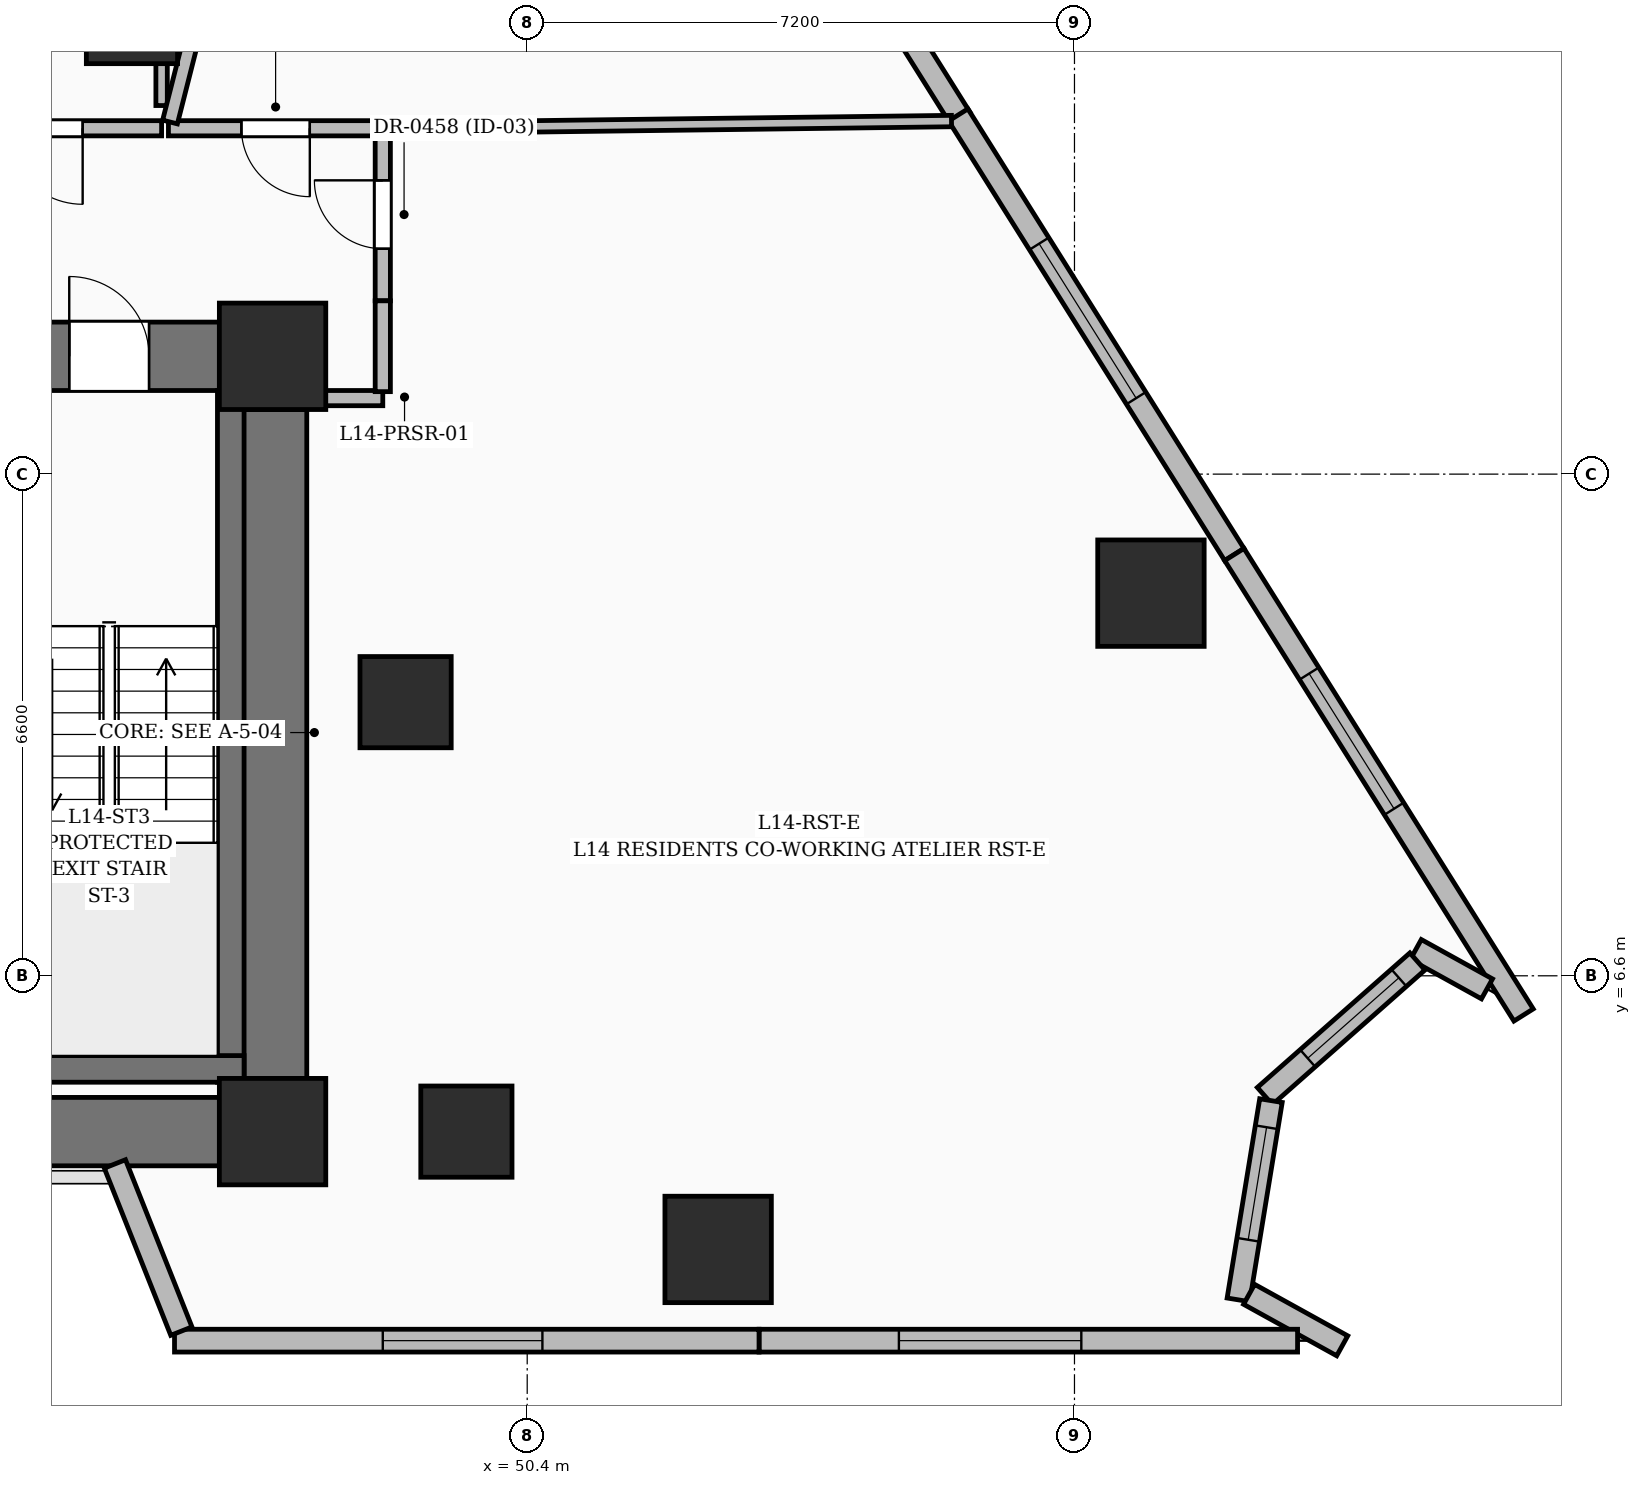
"""IFC4 building model, lengths in metres.
Left out: names, types, materials, properties, quantities, classifications, styles, units other than length and angle.
Written with IfcOpenShell. Run it as: python <this file> out.ifc"""

import sys

from ifc_helpers import new_model, si_unit, direction, frame, frame_2d, origin, origin_2d, place, context, subcontext, project, spatial, rectangle, extrude, element, fill, save


model = new_model("IFC4")
c1 = context("Model", 3, precision=1e-05, world=origin(), true_north=direction((0.0, 1.0)))
c2 = subcontext(c1, "Body", "Model", "MODEL_VIEW")
j1 = project(units=[si_unit("LENGTHUNIT", "METRE"), si_unit("PLANEANGLEUNIT", "RADIAN")], contexts=[c1])
p1 = place(None, origin())
s1 = spatial("IfcSite", under=j1, at=p1, CompositionType="ELEMENT")
p2 = place(p1, origin())
s2 = spatial("IfcBuilding", under=s1, at=p2, CompositionType="ELEMENT")
p3 = place(p2, frame((0.0, 0.0, 60.6)))
s3 = spatial("IfcBuildingStorey", under=s2, at=p3, CompositionType="ELEMENT", Elevation=60.6)
for number, where, z_axis, x_axis in (
    (1, (47.05, 4.55, 0.0), (0.0, 0.0, 1.0), (1.0, 0.0, 0.0)),
    (2, (47.05, 14.75, 0.0), (0.0, 0.0, 1.0), (1.0, 0.0, 0.0)),
):
    element("IfcColumn", number, at=place(p3, frame(where, z_axis=z_axis, x_axis=x_axis)), inside=s3, PredefinedType="COLUMN", context=c2, shape_type="SweptSolid", body=[
        extrude(rectangle(XDim=1.4, YDim=1.4, at=origin_2d()), origin(), (0.0, 0.0, 1.0), 3.6),
    ])
for number, where, z_axis, x_axis in (
    (3, (49.6, 4.55, 0.0), (0.0, 0.0, 1.0), (1.0, 0.0, 0.0)),
    (4, (48.8, 10.2, 0.0), (0.0, 0.0, 1.0), (1.0, 0.0, 0.0)),
    (5, (45.2, 19.2, 0.0), (0.0, 0.0, 1.0), (1.0, 0.0, 0.0)),
):
    element("IfcColumn", number, at=place(p3, frame(where, z_axis=z_axis, x_axis=x_axis)), inside=s3, PredefinedType="COLUMN", context=c2, shape_type="SweptSolid", body=[
        extrude(rectangle(XDim=1.2, YDim=1.2, at=origin_2d()), origin(), (0.0, 0.0, 1.0), 3.6),
    ])
p4 = place(p3, frame((35.85, 4.55, 0.0), z_axis=(0.0, 0.0, 1.0), x_axis=(1.0, 0.0, 0.0)))
e6 = element("IfcWall", 6, at=p4, inside=s3, PredefinedType="SHEAR", context=c2, shape_type="SweptSolid", body=[
    extrude(rectangle(XDim=10.5, YDim=0.9, at=frame_2d((5.25, 0.0))), origin(), (0.0, 0.0, 1.0), 3.6),
])
p5 = place(p3, frame((35.85, 14.75, 0.0), z_axis=(0.0, 0.0, 1.0), x_axis=(1.0, 0.0, 0.0)))
e7 = element("IfcWall", 7, at=p5, inside=s3, PredefinedType="SHEAR", context=c2, shape_type="SweptSolid", body=[
    extrude(rectangle(XDim=10.5, YDim=0.9, at=frame_2d((5.25, 0.0))), origin(), (0.0, 0.0, 1.0), 3.6),
])
p6 = place(p5, frame((0.925, 0.0, 0.0)))
e8 = element("IfcOpeningElement", 8, at=p6, cuts=e7, PredefinedType="OPENING", context=c2, shape_type="SweptSolid", body=[
    extrude(rectangle(XDim=1.05, YDim=2.15, at=frame_2d((0.525, 1.075))), frame((0.0, 0.46, 0.0), z_axis=(0.0, -1.0, 0.0), x_axis=(1.0, 0.0, 0.0)), (0.0, 0.0, 1.0), 0.92),
])
p7 = place(p5, frame((8.525, 0.0, 0.0)))
e9 = element("IfcOpeningElement", 9, at=p7, cuts=e7, PredefinedType="OPENING", context=c2, shape_type="SweptSolid", body=[
    extrude(rectangle(XDim=1.05, YDim=2.15, at=frame_2d((0.525, 1.075))), frame((0.0, 0.46, 0.0), z_axis=(0.0, -1.0, 0.0), x_axis=(1.0, 0.0, 0.0)), (0.0, 0.0, 1.0), 0.92),
])
p8 = place(p3, frame((47.05, 5.25, 0.0), z_axis=(0.0, 0.0, 1.0), x_axis=(0.0, 1.0, 0.0)))
e10 = element("IfcWall", 10, at=p8, inside=s3, PredefinedType="SHEAR", context=c2, shape_type="SweptSolid", body=[
    extrude(rectangle(XDim=8.8, YDim=0.9, at=frame_2d((4.4, 0.0))), origin(), (0.0, 0.0, 1.0), 3.6),
])
p9 = place(p3, frame((46.5, 5.2, 0.0), z_axis=(0.0, 0.0, 1.0), x_axis=(0.0, 1.0, 0.0)))
e11 = element("IfcWall", 11, at=p9, inside=s3, PredefinedType="SOLIDWALL", context=c2, shape_type="SweptSolid", body=[
    extrude(rectangle(XDim=9.1, YDim=0.35, at=frame_2d((4.55, 0.0))), origin(), (0.0, 0.0, 1.0), 3.6),
])
p10 = place(p3, frame((43.125, 5.375, 0.0), z_axis=(0.0, 0.0, 1.0), x_axis=(1.0, 0.0, 0.0)))
e12 = element("IfcWall", 12, at=p10, inside=s3, PredefinedType="SOLIDWALL", context=c2, shape_type="SweptSolid", body=[
    extrude(rectangle(XDim=3.55, YDim=0.35, at=frame_2d((1.775, 0.0))), origin(), (0.0, 0.0, 1.0), 3.6),
])
for number, where, z_axis, x_axis in (
    (13, (52.912, 3.0, 0.0), (0.0, 0.0, 1.0), (1.0, 0.0, 0.0)),
    (14, (58.606, 11.634, 0.0), (0.0, 0.0, 1.0), (1.0, 0.0, 0.0)),
):
    element("IfcColumn", number, at=place(p3, frame(where, z_axis=z_axis, x_axis=x_axis)), inside=s3, PredefinedType="COLUMN", context=c2, shape_type="SweptSolid", body=[
        extrude(rectangle(XDim=1.4, YDim=1.4, at=origin_2d()), origin(), (0.0, 0.0, 1.0), 3.6),
    ])
p11 = place(p3, frame((52.093, 24.259, 0.0), z_axis=(0.0, 0.0, 1.0), x_axis=(0.531905989854, -0.846803411635, 0.0)))
e15 = element("IfcWall", 15, at=p11, inside=s3, PredefinedType="SOLIDWALL", context=c2, shape_type="SweptSolid", body=[
    extrude(rectangle(XDim=7.532, YDim=0.3, at=frame_2d((3.766, 0.0))), origin(), (0.0, 0.0, 1.0), 3.35),
])
p12 = place(p11, frame((2.925, 0.0, 0.8)))
e16 = element("IfcOpeningElement", 16, at=p12, cuts=e15, PredefinedType="OPENING", context=c2, shape_type="SweptSolid", body=[
    extrude(rectangle(XDim=1.2, YDim=1.8, at=frame_2d((0.6, 0.9))), frame((0.0, 0.16, 0.0), z_axis=(0.0, -1.0, 0.0), x_axis=(1.0, 0.0, 0.0)), (0.0, 0.0, 1.0), 0.32),
])
p13 = place(p3, frame((56.071, 17.925, 0.0), z_axis=(0.0, 0.0, 1.0), x_axis=(0.531906470689, -0.846803109607, 0.0)))
e17 = element("IfcWall", 17, at=p13, inside=s3, PredefinedType="SOLIDWALL", context=c2, shape_type="SweptSolid", body=[
    extrude(rectangle(XDim=6.829, YDim=0.3, at=frame_2d((3.415, 0.0))), origin(), (0.0, 0.0, 1.0), 3.35),
])
p14 = place(p13, frame((2.0, 0.0, 0.6)))
e18 = element("IfcOpeningElement", 18, at=p14, cuts=e17, PredefinedType="OPENING", context=c2, shape_type="SweptSolid", body=[
    extrude(rectangle(XDim=2.4, YDim=2.1, at=frame_2d((1.2, 1.05))), frame((0.0, 0.16, 0.0), z_axis=(0.0, -1.0, 0.0), x_axis=(1.0, 0.0, 0.0)), (0.0, 0.0, 1.0), 0.32),
])
p15 = place(p3, frame((59.703, 12.143, 0.0), z_axis=(0.0, 0.0, 1.0), x_axis=(0.531917824745, -0.846795977623, 0.0)))
e19 = element("IfcWall", 19, at=p15, inside=s3, PredefinedType="SOLIDWALL", context=c2, shape_type="SweptSolid", body=[
    extrude(rectangle(XDim=7.154, YDim=0.3, at=frame_2d((3.577, 0.0))), origin(), (0.0, 0.0, 1.0), 3.35),
])
p16 = place(p15, frame((1.85, 0.0, 0.55)))
e20 = element("IfcOpeningElement", 20, at=p16, cuts=e19, PredefinedType="OPENING", context=c2, shape_type="SweptSolid", body=[
    extrude(rectangle(XDim=2.1, YDim=2.4, at=frame_2d((1.05, 1.2))), frame((0.0, 0.16, 0.0), z_axis=(0.0, -1.0, 0.0), x_axis=(1.0, 0.0, 0.0)), (0.0, 0.0, 1.0), 0.32),
])
p17 = place(p3, frame((63.027, 6.428, 0.0), z_axis=(0.0, 0.0, 1.0), x_axis=(-0.875134767643, 0.483879260211, 0.0)))
e21 = element("IfcWall", 21, at=p17, inside=s3, PredefinedType="SOLIDWALL", context=c2, shape_type="SweptSolid", body=[
    extrude(rectangle(XDim=1.07, YDim=0.3, at=frame_2d((0.535, 0.0))), origin(), (0.0, 0.0, 1.0), 3.35),
])
p18 = place(p3, frame((62.112, 6.789, 0.0), z_axis=(0.0, 0.0, 1.0), x_axis=(-0.749880449764, -0.661573360303, 0.0)))
e22 = element("IfcWall", 22, at=p18, inside=s3, PredefinedType="SOLIDWALL", context=c2, shape_type="SweptSolid", body=[
    extrude(rectangle(XDim=2.676, YDim=0.3, at=frame_2d((1.338, 0.0))), origin(), (0.0, 0.0, 1.0), 3.35),
])
p19 = place(p18, frame((0.325, 0.0, 0.55)))
e23 = element("IfcOpeningElement", 23, at=p19, cuts=e22, PredefinedType="OPENING", context=c2, shape_type="SweptSolid", body=[
    extrude(rectangle(XDim=1.6, YDim=2.2, at=frame_2d((0.8, 1.1))), frame((0.0, 0.16, 0.0), z_axis=(0.0, -1.0, 0.0), x_axis=(1.0, 0.0, 0.0)), (0.0, 0.0, 1.0), 0.32),
])
p20 = place(p3, frame((60.185, 4.958, 0.0), z_axis=(0.0, 0.0, 1.0), x_axis=(-0.16141694699, -0.986886300049, 0.0)))
e24 = element("IfcWall", 24, at=p20, inside=s3, PredefinedType="SOLIDWALL", context=c2, shape_type="SweptSolid", body=[
    extrude(rectangle(XDim=2.656, YDim=0.3, at=frame_2d((1.328, 0.0))), origin(), (0.0, 0.0, 1.0), 3.35),
])
p21 = place(p20, frame((0.355, 0.0, 0.6)))
e25 = element("IfcOpeningElement", 25, at=p21, cuts=e24, PredefinedType="OPENING", context=c2, shape_type="SweptSolid", body=[
    extrude(rectangle(XDim=1.5, YDim=2.1, at=frame_2d((0.75, 1.05))), frame((0.0, 0.16, 0.0), z_axis=(0.0, -1.0, 0.0), x_axis=(1.0, 0.0, 0.0)), (0.0, 0.0, 1.0), 0.32),
])
p22 = place(p3, frame((59.897, 2.41, 0.0), z_axis=(0.0, 0.0, 1.0), x_axis=(0.875216279123, -0.483731810777, 0.0)))
e26 = element("IfcWall", 26, at=p22, inside=s3, PredefinedType="SOLIDWALL", context=c2, shape_type="SweptSolid", body=[
    extrude(rectangle(XDim=1.4, YDim=0.3, at=frame_2d((0.7, 0.0))), origin(), (0.0, 0.0, 1.0), 3.35),
])
p23 = place(p3, frame((60.535, 1.8, 0.0), z_axis=(0.0, 0.0, 1.0), x_axis=(-1.0, 0.0, 0.0)))
e27 = element("IfcWall", 27, at=p23, inside=s3, PredefinedType="SOLIDWALL", context=c2, shape_type="SweptSolid", body=[
    extrude(rectangle(XDim=7.085, YDim=0.3, at=frame_2d((3.542, 0.0))), origin(), (0.0, 0.0, 1.0), 3.35),
])
p24 = place(p23, frame((2.845, 0.0, 0.6)))
e28 = element("IfcOpeningElement", 28, at=p24, cuts=e27, PredefinedType="OPENING", context=c2, shape_type="SweptSolid", body=[
    extrude(rectangle(XDim=2.4, YDim=2.1, at=frame_2d((1.2, 1.05))), frame((0.0, 0.16, 0.0), z_axis=(0.0, -1.0, 0.0), x_axis=(1.0, 0.0, 0.0)), (0.0, 0.0, 1.0), 0.32),
])
p25 = place(p3, frame((53.45, 1.8, 0.0), z_axis=(0.0, 0.0, 1.0), x_axis=(-1.0, 0.0, 0.0)))
e29 = element("IfcWall", 29, at=p25, inside=s3, PredefinedType="SOLIDWALL", context=c2, shape_type="SweptSolid", body=[
    extrude(rectangle(XDim=7.69, YDim=0.3, at=frame_2d((3.845, 0.0))), origin(), (0.0, 0.0, 1.0), 3.35),
])
p26 = place(p25, frame((2.85, 0.0, 0.55)))
e30 = element("IfcOpeningElement", 30, at=p26, cuts=e29, PredefinedType="OPENING", context=c2, shape_type="SweptSolid", body=[
    extrude(rectangle(XDim=2.1, YDim=2.4, at=frame_2d((1.05, 1.2))), frame((0.0, 0.16, 0.0), z_axis=(0.0, -1.0, 0.0), x_axis=(1.0, 0.0, 0.0)), (0.0, 0.0, 1.0), 0.32),
])
p27 = place(p3, frame((45.85, 1.925, 0.0), z_axis=(0.0, 0.0, 1.0), x_axis=(-0.36946923074, 0.92924296475, 0.0)))
e31 = element("IfcWall", 31, at=p27, inside=s3, PredefinedType="SOLIDWALL", context=c2, shape_type="SweptSolid", body=[
    extrude(rectangle(XDim=2.367, YDim=0.3, at=frame_2d((1.184, 0.0))), origin(), (0.0, 0.0, 1.0), 2.375),
])
p28 = place(p3, frame((47.5, 14.2, 0.0), z_axis=(0.0, 0.0, 1.0), x_axis=(1.0, 0.0, 0.0)))
e32 = element("IfcWall", 32, at=p28, inside=s3, PredefinedType="PARTITIONING", context=c2, shape_type="SweptSolid", body=[
    extrude(rectangle(XDim=1.0, YDim=0.2, at=frame_2d((0.5, 0.0))), origin(), (0.0, 0.0, 1.0), 3.35),
])
p29 = place(p3, frame((48.5, 15.48, 0.0), z_axis=(0.0, 0.0, 1.0), x_axis=(0.0, 1.0, 0.0)))
e33 = element("IfcWall", 33, at=p29, inside=s3, PredefinedType="PARTITIONING", context=c2, shape_type="SweptSolid", body=[
    extrude(rectangle(XDim=2.27, YDim=0.2, at=frame_2d((1.135, 0.0))), origin(), (0.0, 0.0, 1.0), 2.279),
])
p30 = place(p29, frame((0.685, 0.0, 0.0)))
e34 = element("IfcOpeningElement", 34, at=p30, cuts=e33, PredefinedType="OPENING", context=c2, shape_type="SweptSolid", body=[
    extrude(rectangle(XDim=0.9, YDim=2.1, at=frame_2d((0.45, 1.05))), frame((0.0, 0.11, 0.0), z_axis=(0.0, -1.0, 0.0), x_axis=(1.0, 0.0, 0.0)), (0.0, 0.0, 1.0), 0.22),
])
p31 = place(p3, frame((45.59, 17.75, 0.0), z_axis=(0.0, 0.0, 1.0), x_axis=(-1.0, 0.0, 0.0)))
e35 = element("IfcWall", 35, at=p31, inside=s3, PredefinedType="PARTITIONING", context=c2, shape_type="SweptSolid", body=[
    extrude(rectangle(XDim=2.74, YDim=0.2, at=frame_2d((1.37, 0.0))), origin(), (0.0, 0.0, 1.0), 2.309),
])
p32 = place(p31, frame((1.039, 0.0, 0.0)))
e36 = element("IfcOpeningElement", 36, at=p32, cuts=e35, PredefinedType="OPENING", context=c2, shape_type="SweptSolid", body=[
    extrude(rectangle(XDim=1.0, YDim=2.2, at=frame_2d((0.5, 1.1))), frame((0.0, 0.11, 0.0), z_axis=(0.0, -1.0, 0.0), x_axis=(1.0, 0.0, 0.0)), (0.0, 0.0, 1.0), 0.22),
])
p33 = place(p3, frame((48.415, 17.75, 0.0), z_axis=(0.0, 0.0, 1.0), x_axis=(-1.0, 0.0, 0.0)))
e37 = element("IfcWall", 37, at=p33, inside=s3, PredefinedType="PARTITIONING", context=c2, shape_type="SweptSolid", body=[
    extrude(rectangle(XDim=2.735, YDim=0.2, at=frame_2d((1.368, 0.0))), origin(), (0.0, 0.0, 1.0), 2.309),
])
p34 = place(p33, frame((0.875, 0.0, 0.0)))
e38 = element("IfcOpeningElement", 38, at=p34, cuts=e37, PredefinedType="OPENING", context=c2, shape_type="SweptSolid", body=[
    extrude(rectangle(XDim=0.9, YDim=2.1, at=frame_2d((0.45, 1.05))), frame((0.0, 0.11, 0.0), z_axis=(0.0, -1.0, 0.0), x_axis=(1.0, 0.0, 0.0)), (0.0, 0.0, 1.0), 0.22),
])
p35 = place(p3, frame((55.982, 17.845, 0.0), z_axis=(0.0, 0.0, 1.0), x_axis=(-0.999919274462, -0.012706083592, 0.0)))
e39 = element("IfcWall", 39, at=p35, inside=s3, PredefinedType="PARTITIONING", context=c2, shape_type="SweptSolid", body=[
    extrude(rectangle(XDim=7.397, YDim=0.15, at=frame_2d((3.699, 0.0))), origin(), (0.0, 0.0, 1.0), 2.279),
])
p36 = place(p3, frame((45.59, 18.049, 0.0), z_axis=(0.0, 0.0, 1.0), x_axis=(0.0, 1.0, 0.0)))
e40 = element("IfcWall", 40, at=p36, inside=s3, PredefinedType="PARTITIONING", context=c2, shape_type="SweptSolid", body=[
    extrude(rectangle(XDim=4.473, YDim=0.15, at=frame_2d((2.237, 0.0))), origin(), (0.0, 0.0, 1.0), 2.279),
])
p37 = place(p3, frame((45.701, 17.833, 0.0), z_axis=(0.0, 0.0, 1.0), x_axis=(0.246225051857, 0.969212682458, 0.0)))
e41 = element("IfcWall", 41, at=p37, inside=s3, PredefinedType="PARTITIONING", context=c2, shape_type="SweptSolid", body=[
    extrude(rectangle(XDim=12.014, YDim=0.2, at=frame_2d((6.007, 0.0))), origin(), (0.0, 0.0, 1.0), 2.309),
])
p38 = place(p3, frame((48.5, 14.285, 0.0), z_axis=(0.0, 0.0, 1.0), x_axis=(0.0, 1.0, 0.0)))
e42 = element("IfcWall", 42, at=p38, inside=s3, PredefinedType="PARTITIONING", context=c2, shape_type="SweptSolid", body=[
    extrude(rectangle(XDim=1.195, YDim=0.2, at=frame_2d((0.598, 0.0))), origin(), (0.0, 0.0, 1.0), 3.35),
])
p39 = place(p14, origin())
e43 = element("IfcWindow", 43, at=p39, inside=s3, PartitioningType="SINGLE_PANEL", PredefinedType="WINDOW", context=c2, shape_type="SweptSolid", body=[
    extrude(rectangle(XDim=2.4, YDim=2.1, at=frame_2d((1.2, 1.05))), frame((0.0, 0.03, 0.0), z_axis=(0.0, -1.0, 0.0), x_axis=(1.0, 0.0, 0.0)), (0.0, 0.0, 1.0), 0.06),
])
fill(e18, e43)
p40 = place(p16, origin())
e44 = element("IfcWindow", 44, at=p40, inside=s3, PartitioningType="SINGLE_PANEL", PredefinedType="WINDOW", context=c2, shape_type="SweptSolid", body=[
    extrude(rectangle(XDim=2.1, YDim=2.4, at=frame_2d((1.05, 1.2))), frame((0.0, 0.03, 0.0), z_axis=(0.0, -1.0, 0.0), x_axis=(1.0, 0.0, 0.0)), (0.0, 0.0, 1.0), 0.06),
])
fill(e20, e44)
p41 = place(p19, origin())
e45 = element("IfcWindow", 45, at=p41, inside=s3, PartitioningType="SINGLE_PANEL", PredefinedType="WINDOW", context=c2, shape_type="SweptSolid", body=[
    extrude(rectangle(XDim=1.6, YDim=2.2, at=frame_2d((0.8, 1.1))), frame((0.0, 0.03, 0.0), z_axis=(0.0, -1.0, 0.0), x_axis=(1.0, 0.0, 0.0)), (0.0, 0.0, 1.0), 0.06),
])
fill(e23, e45)
p42 = place(p21, origin())
e46 = element("IfcWindow", 46, at=p42, inside=s3, PartitioningType="SINGLE_PANEL", PredefinedType="WINDOW", context=c2, shape_type="SweptSolid", body=[
    extrude(rectangle(XDim=1.5, YDim=2.1, at=frame_2d((0.75, 1.05))), frame((0.0, 0.03, 0.0), z_axis=(0.0, -1.0, 0.0), x_axis=(1.0, 0.0, 0.0)), (0.0, 0.0, 1.0), 0.06),
])
fill(e25, e46)
p43 = place(p24, origin())
e47 = element("IfcWindow", 47, at=p43, inside=s3, PartitioningType="SINGLE_PANEL", PredefinedType="WINDOW", context=c2, shape_type="SweptSolid", body=[
    extrude(rectangle(XDim=2.4, YDim=2.1, at=frame_2d((1.2, 1.05))), frame((0.0, 0.03, 0.0), z_axis=(0.0, -1.0, 0.0), x_axis=(1.0, 0.0, 0.0)), (0.0, 0.0, 1.0), 0.06),
])
fill(e28, e47)
p44 = place(p26, origin())
e48 = element("IfcWindow", 48, at=p44, inside=s3, PartitioningType="SINGLE_PANEL", PredefinedType="WINDOW", context=c2, shape_type="SweptSolid", body=[
    extrude(rectangle(XDim=2.1, YDim=2.4, at=frame_2d((1.05, 1.2))), frame((0.0, 0.03, 0.0), z_axis=(0.0, -1.0, 0.0), x_axis=(1.0, 0.0, 0.0)), (0.0, 0.0, 1.0), 0.06),
])
fill(e30, e48)
p45 = place(p7, origin())
e49 = element("IfcDoor", 49, at=p45, inside=s3, OperationType="SINGLE_SWING_LEFT", PredefinedType="DOOR", context=c2, shape_type="SweptSolid", body=[
    extrude(rectangle(XDim=1.05, YDim=2.15, at=frame_2d((0.525, 1.075))), frame((0.0, 0.025, 0.0), z_axis=(0.0, -1.0, 0.0), x_axis=(1.0, 0.0, 0.0)), (0.0, 0.0, 1.0), 0.05),
])
fill(e9, e49)
p46 = place(p30, origin())
e50 = element("IfcDoor", 50, at=p46, inside=s3, OperationType="SINGLE_SWING_RIGHT", PredefinedType="DOOR", context=c2, shape_type="SweptSolid", body=[
    extrude(rectangle(XDim=0.9, YDim=2.1, at=frame_2d((0.45, 1.05))), frame((0.0, 0.025, 0.0), z_axis=(0.0, -1.0, 0.0), x_axis=(1.0, 0.0, 0.0)), (0.0, 0.0, 1.0), 0.05),
])
fill(e34, e50)
p47 = place(p34, origin())
e51 = element("IfcDoor", 51, at=p47, inside=s3, OperationType="SINGLE_SWING_LEFT", PredefinedType="DOOR", context=c2, shape_type="SweptSolid", body=[
    extrude(rectangle(XDim=0.9, YDim=2.1, at=frame_2d((0.45, 1.05))), frame((0.0, 0.025, 0.0), z_axis=(0.0, -1.0, 0.0), x_axis=(1.0, 0.0, 0.0)), (0.0, 0.0, 1.0), 0.05),
])
fill(e38, e51)
p48 = place(p32, origin())
e52 = element("IfcDoor", 52, at=p48, inside=s3, OperationType="SINGLE_SWING_LEFT", PredefinedType="DOOR", context=c2, shape_type="SweptSolid", body=[
    extrude(rectangle(XDim=1.0, YDim=2.2, at=frame_2d((0.5, 1.1))), frame((0.0, 0.025, 0.0), z_axis=(0.0, -1.0, 0.0), x_axis=(1.0, 0.0, 0.0)), (0.0, 0.0, 1.0), 0.05),
])
fill(e36, e52)
save(model, sys.argv[1])
